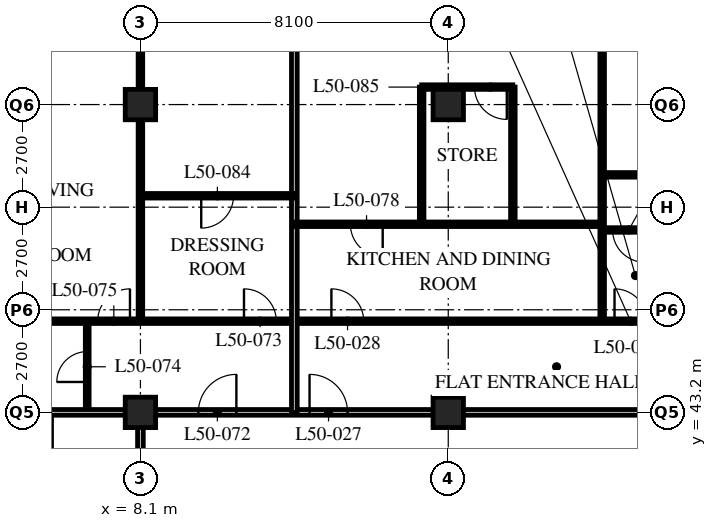
"""IFC4 building model, lengths in metres.
Left out: names, types, materials, properties, quantities, classifications, styles, units other than length and angle.
Written with IfcOpenShell. Run it as: python <this file> out.ifc"""

import sys

from ifc_helpers import new_model, si_unit, direction, frame, frame_2d, origin, origin_2d, place, context, subcontext, project, spatial, rectangle, hollow_rectangle, extrude, element, fill, save


model = new_model("IFC4")
c1 = context("Model", 3, precision=1e-05, world=origin(), true_north=direction((0.0, 1.0)))
c2 = subcontext(c1, "Body", "Model", "MODEL_VIEW")
j1 = project(units=[si_unit("LENGTHUNIT", "METRE"), si_unit("PLANEANGLEUNIT", "RADIAN")], contexts=[c1])
p1 = place(None, origin())
s1 = spatial("IfcSite", under=j1, at=p1, CompositionType="ELEMENT")
p2 = place(p1, origin())
s2 = spatial("IfcBuilding", under=s1, at=p2, CompositionType="ELEMENT")
p3 = place(p2, frame((0.0, 0.0, 195.6)))
s3 = spatial("IfcBuildingStorey", under=s2, at=p3, CompositionType="ELEMENT", Elevation=195.6)
for number, where, z_axis, x_axis in (
    (1, (8.1, 43.2, 0.0), (0.0, 0.0, 1.0), (1.0, 0.0, 0.0)),
    (2, (8.1, 51.3, 0.0), (0.0, 0.0, 1.0), (1.0, 0.0, 0.0)),
    (3, (16.2, 43.2, 0.0), (0.0, 0.0, 1.0), (1.0, 0.0, 0.0)),
    (4, (16.2, 51.3, 0.0), (0.0, 0.0, 1.0), (1.0, 0.0, 0.0)),
):
    element("IfcColumn", number, at=place(p3, frame(where, z_axis=z_axis, x_axis=x_axis)), inside=s3, PredefinedType="COLUMN", context=c2, shape_type="SweptSolid", body=[
        extrude(hollow_rectangle(XDim=0.8, YDim=0.8, WallThickness=0.08, at=origin_2d()), origin(), (0.0, 0.0, 1.0), 3.6),
    ])
p4 = place(p3, frame((8.1, 43.2, 0.0), z_axis=(0.0, 0.0, 1.0), x_axis=(1.0, 0.0, 0.0)))
e5 = element("IfcWall", 5, at=p4, inside=s3, PredefinedType="PARTITIONING", context=c2, shape_type="SweptSolid", body=[
    extrude(rectangle(XDim=40.5, YDim=0.15, at=frame_2d((20.25, 0.0))), origin(), (0.0, 0.0, 1.0), 2.778),
])
p5 = place(p4, frame((4.45, 0.0, 0.0)))
e6 = element("IfcOpeningElement", 6, at=p5, cuts=e5, PredefinedType="OPENING", context=c2, shape_type="SweptSolid", body=[
    extrude(rectangle(XDim=1.0, YDim=2.1, at=frame_2d((0.5, 1.05))), frame((0.0, 0.085, 0.0), z_axis=(0.0, -1.0, 0.0), x_axis=(1.0, 0.0, 0.0)), (0.0, 0.0, 1.0), 0.17),
])
p6 = place(p4, frame((20.65, 0.0, 0.0)))
e7 = element("IfcOpeningElement", 7, at=p6, cuts=e5, PredefinedType="OPENING", context=c2, shape_type="SweptSolid", body=[
    extrude(rectangle(XDim=1.0, YDim=2.1, at=frame_2d((0.5, 1.05))), frame((0.0, 0.085, 0.0), z_axis=(0.0, -1.0, 0.0), x_axis=(1.0, 0.0, 0.0)), (0.0, 0.0, 1.0), 0.17),
])
p7 = place(p4, frame((28.75, 0.0, 0.0)))
e8 = element("IfcOpeningElement", 8, at=p7, cuts=e5, PredefinedType="OPENING", context=c2, shape_type="SweptSolid", body=[
    extrude(rectangle(XDim=1.0, YDim=2.1, at=frame_2d((0.5, 1.05))), frame((0.0, 0.085, 0.0), z_axis=(0.0, -1.0, 0.0), x_axis=(1.0, 0.0, 0.0)), (0.0, 0.0, 1.0), 0.17),
])
p8 = place(p4, frame((37.975, 0.0, 0.0)))
e9 = element("IfcOpeningElement", 9, at=p8, cuts=e5, PredefinedType="OPENING", context=c2, shape_type="SweptSolid", body=[
    extrude(rectangle(XDim=1.0, YDim=2.1, at=frame_2d((0.5, 1.05))), frame((0.0, 0.085, 0.0), z_axis=(0.0, -1.0, 0.0), x_axis=(1.0, 0.0, 0.0)), (0.0, 0.0, 1.0), 0.17),
])
p9 = place(p4, frame((1.525, 0.0, 0.0)))
e10 = element("IfcOpeningElement", 10, at=p9, cuts=e5, PredefinedType="OPENING", context=c2, shape_type="SweptSolid", body=[
    extrude(rectangle(XDim=1.0, YDim=2.1, at=frame_2d((0.5, 1.05))), frame((0.0, 0.085, 0.0), z_axis=(0.0, -1.0, 0.0), x_axis=(1.0, 0.0, 0.0)), (0.0, 0.0, 1.0), 0.17),
])
p10 = place(p3, frame((8.1, 18.9, 0.0), z_axis=(0.0, 0.0, 1.0), x_axis=(0.0, 1.0, 0.0)))
e11 = element("IfcWall", 11, at=p10, inside=s3, PredefinedType="PARTITIONING", context=c2, shape_type="SweptSolid", body=[
    extrude(rectangle(XDim=24.3, YDim=0.15, at=frame_2d((12.15, 0.0))), origin(), (0.0, 0.0, 1.0), 2.778),
])
p11 = place(p10, frame((0.9, 0.0, 0.0)))
e12 = element("IfcOpeningElement", 12, at=p11, cuts=e11, PredefinedType="OPENING", context=c2, shape_type="SweptSolid", body=[
    extrude(rectangle(XDim=1.0, YDim=2.1, at=frame_2d((0.5, 1.05))), frame((0.0, 0.085, 0.0), z_axis=(0.0, -1.0, 0.0), x_axis=(1.0, 0.0, 0.0)), (0.0, 0.0, 1.0), 0.17),
])
p12 = place(p10, frame((9.0, 0.0, 0.0)))
e13 = element("IfcOpeningElement", 13, at=p12, cuts=e11, PredefinedType="OPENING", context=c2, shape_type="SweptSolid", body=[
    extrude(rectangle(XDim=1.0, YDim=2.1, at=frame_2d((0.5, 1.05))), frame((0.0, 0.085, 0.0), z_axis=(0.0, -1.0, 0.0), x_axis=(1.0, 0.0, 0.0)), (0.0, 0.0, 1.0), 0.17),
])
p13 = place(p10, frame((17.1, 0.0, 0.0)))
e14 = element("IfcOpeningElement", 14, at=p13, cuts=e11, PredefinedType="OPENING", context=c2, shape_type="SweptSolid", body=[
    extrude(rectangle(XDim=1.0, YDim=2.1, at=frame_2d((0.5, 1.05))), frame((0.0, 0.085, 0.0), z_axis=(0.0, -1.0, 0.0), x_axis=(1.0, 0.0, 0.0)), (0.0, 0.0, 1.0), 0.17),
])
p14 = place(p3, frame((20.25, 45.6, 0.0), z_axis=(0.0, 0.0, 1.0), x_axis=(0.0, 1.0, 0.0)))
e15 = element("IfcWall", 15, at=p14, inside=s3, PredefinedType="PARTITIONING", context=c2, shape_type="SweptSolid", body=[
    extrude(rectangle(XDim=13.5, YDim=0.12, at=frame_2d((6.75, 0.0))), origin(), (0.0, 0.0, 1.0), 3.39),
])
p15 = place(p3, frame((6.7, 43.2, 0.0), z_axis=(0.0, 0.0, 1.0), x_axis=(0.0, 1.0, 0.0)))
e16 = element("IfcWall", 16, at=p15, inside=s3, PredefinedType="PARTITIONING", context=c2, shape_type="SweptSolid", body=[
    extrude(rectangle(XDim=2.4, YDim=0.1, at=frame_2d((1.2, 0.0))), origin(), (0.0, 0.0, 1.0), 3.39),
])
p16 = place(p15, frame((0.8, 0.0, 0.0)))
e17 = element("IfcOpeningElement", 17, at=p16, cuts=e16, PredefinedType="OPENING", context=c2, shape_type="SweptSolid", body=[
    extrude(rectangle(XDim=0.8, YDim=2.1, at=frame_2d((0.4, 1.05))), frame((0.0, 0.06, 0.0), z_axis=(0.0, -1.0, 0.0), x_axis=(1.0, 0.0, 0.0)), (0.0, 0.0, 1.0), 0.12),
])
p17 = place(p3, frame((4.1, 45.6, 0.0), z_axis=(0.0, 0.0, 1.0), x_axis=(1.0, 0.0, 0.0)))
e18 = element("IfcWall", 18, at=p17, inside=s3, PredefinedType="PARTITIONING", context=c2, shape_type="SweptSolid", body=[
    extrude(rectangle(XDim=48.5, YDim=0.12, at=frame_2d((24.25, 0.0))), origin(), (0.0, 0.0, 1.0), 3.39),
])
p18 = place(p17, frame((9.025, 0.0, 0.0)))
e19 = element("IfcOpeningElement", 19, at=p18, cuts=e18, PredefinedType="OPENING", context=c2, shape_type="SweptSolid", body=[
    extrude(rectangle(XDim=0.85, YDim=2.1, at=frame_2d((0.425, 1.05))), frame((0.0, 0.07, 0.0), z_axis=(0.0, -1.0, 0.0), x_axis=(1.0, 0.0, 0.0)), (0.0, 0.0, 1.0), 0.14),
])
p19 = place(p17, frame((16.475, 0.0, 0.0)))
e20 = element("IfcOpeningElement", 20, at=p19, cuts=e18, PredefinedType="OPENING", context=c2, shape_type="SweptSolid", body=[
    extrude(rectangle(XDim=0.85, YDim=2.1, at=frame_2d((0.425, 1.05))), frame((0.0, 0.07, 0.0), z_axis=(0.0, -1.0, 0.0), x_axis=(1.0, 0.0, 0.0)), (0.0, 0.0, 1.0), 0.14),
])
p20 = place(p17, frame((20.525, 0.0, 0.0)))
e21 = element("IfcOpeningElement", 21, at=p20, cuts=e18, PredefinedType="OPENING", context=c2, shape_type="SweptSolid", body=[
    extrude(rectangle(XDim=0.85, YDim=2.1, at=frame_2d((0.425, 1.05))), frame((0.0, 0.07, 0.0), z_axis=(0.0, -1.0, 0.0), x_axis=(1.0, 0.0, 0.0)), (0.0, 0.0, 1.0), 0.14),
])
p21 = place(p17, frame((25.225, 0.0, 0.0)))
e22 = element("IfcOpeningElement", 22, at=p21, cuts=e18, PredefinedType="OPENING", context=c2, shape_type="SweptSolid", body=[
    extrude(rectangle(XDim=0.85, YDim=2.1, at=frame_2d((0.425, 1.05))), frame((0.0, 0.07, 0.0), z_axis=(0.0, -1.0, 0.0), x_axis=(1.0, 0.0, 0.0)), (0.0, 0.0, 1.0), 0.14),
])
p22 = place(p17, frame((28.625, 0.0, 0.0)))
e23 = element("IfcOpeningElement", 23, at=p22, cuts=e18, PredefinedType="OPENING", context=c2, shape_type="SweptSolid", body=[
    extrude(rectangle(XDim=0.85, YDim=2.1, at=frame_2d((0.425, 1.05))), frame((0.0, 0.07, 0.0), z_axis=(0.0, -1.0, 0.0), x_axis=(1.0, 0.0, 0.0)), (0.0, 0.0, 1.0), 0.14),
])
p23 = place(p17, frame((33.325, 0.0, 0.0)))
e24 = element("IfcOpeningElement", 24, at=p23, cuts=e18, PredefinedType="OPENING", context=c2, shape_type="SweptSolid", body=[
    extrude(rectangle(XDim=0.85, YDim=2.1, at=frame_2d((0.425, 1.05))), frame((0.0, 0.07, 0.0), z_axis=(0.0, -1.0, 0.0), x_axis=(1.0, 0.0, 0.0)), (0.0, 0.0, 1.0), 0.14),
])
p24 = place(p17, frame((36.725, 0.0, 0.0)))
e25 = element("IfcOpeningElement", 25, at=p24, cuts=e18, PredefinedType="OPENING", context=c2, shape_type="SweptSolid", body=[
    extrude(rectangle(XDim=0.85, YDim=2.1, at=frame_2d((0.425, 1.05))), frame((0.0, 0.07, 0.0), z_axis=(0.0, -1.0, 0.0), x_axis=(1.0, 0.0, 0.0)), (0.0, 0.0, 1.0), 0.14),
])
p25 = place(p17, frame((40.925, 0.0, 0.0)))
e26 = element("IfcOpeningElement", 26, at=p25, cuts=e18, PredefinedType="OPENING", context=c2, shape_type="SweptSolid", body=[
    extrude(rectangle(XDim=0.85, YDim=2.1, at=frame_2d((0.425, 1.05))), frame((0.0, 0.07, 0.0), z_axis=(0.0, -1.0, 0.0), x_axis=(1.0, 0.0, 0.0)), (0.0, 0.0, 1.0), 0.14),
])
p26 = place(p17, frame((44.775, 0.0, 0.0)))
e27 = element("IfcOpeningElement", 27, at=p26, cuts=e18, PredefinedType="OPENING", context=c2, shape_type="SweptSolid", body=[
    extrude(rectangle(XDim=0.85, YDim=2.1, at=frame_2d((0.425, 1.05))), frame((0.0, 0.07, 0.0), z_axis=(0.0, -1.0, 0.0), x_axis=(1.0, 0.0, 0.0)), (0.0, 0.0, 1.0), 0.14),
])
p27 = place(p17, frame((6.725, 0.0, 0.0)))
e28 = element("IfcOpeningElement", 28, at=p27, cuts=e18, PredefinedType="OPENING", context=c2, shape_type="SweptSolid", body=[
    extrude(rectangle(XDim=0.85, YDim=2.1, at=frame_2d((0.425, 1.05))), frame((0.0, 0.07, 0.0), z_axis=(0.0, -1.0, 0.0), x_axis=(1.0, 0.0, 0.0)), (0.0, 0.0, 1.0), 0.14),
])
p28 = place(p17, frame((2.875, 0.0, 0.0)))
e29 = element("IfcOpeningElement", 29, at=p28, cuts=e18, PredefinedType="OPENING", context=c2, shape_type="SweptSolid", body=[
    extrude(rectangle(XDim=0.85, YDim=2.1, at=frame_2d((0.425, 1.05))), frame((0.0, 0.07, 0.0), z_axis=(0.0, -1.0, 0.0), x_axis=(1.0, 0.0, 0.0)), (0.0, 0.0, 1.0), 0.14),
])
p29 = place(p3, frame((8.1, 45.6, 0.0), z_axis=(0.0, 0.0, 1.0), x_axis=(0.0, 1.0, 0.0)))
e30 = element("IfcWall", 30, at=p29, inside=s3, PredefinedType="PARTITIONING", context=c2, shape_type="SweptSolid", body=[
    extrude(rectangle(XDim=9.45, YDim=0.12, at=frame_2d((4.725, 0.0))), origin(), (0.0, 0.0, 1.0), 2.778),
])
p30 = place(p3, frame((0.3, 43.2, 0.0), z_axis=(0.0, 0.0, 1.0), x_axis=(1.0, 0.0, 0.0)))
e31 = element("IfcWall", 31, at=p30, inside=s3, PredefinedType="PARTITIONING", context=c2, shape_type="SweptSolid", body=[
    extrude(rectangle(XDim=7.8, YDim=0.15, at=frame_2d((3.9, 0.0))), origin(), (0.0, 0.0, 1.0), 2.778),
])
p31 = place(p3, frame((12.15, 43.2, 0.0), z_axis=(0.0, 0.0, 1.0), x_axis=(0.0, 1.0, 0.0)))
e32 = element("IfcWall", 32, at=p31, inside=s3, PredefinedType="PARTITIONING", context=c2, shape_type="SweptSolid", body=[
    extrude(rectangle(XDim=15.9, YDim=0.15, at=frame_2d((7.95, 0.0))), origin(), (0.0, 0.0, 1.0), 3.39),
])
p32 = place(p3, frame((20.25, 48.0, 0.0), z_axis=(0.0, 0.0, 1.0), x_axis=(1.0, 0.0, 0.0)))
e33 = element("IfcWall", 33, at=p32, inside=s3, PredefinedType="PARTITIONING", context=c2, shape_type="SweptSolid", body=[
    extrude(rectangle(XDim=1.76, YDim=0.12, at=frame_2d((0.88, 0.0))), origin(), (0.0, 0.0, 1.0), 3.39),
])
p33 = place(p32, frame((0.275, 0.0, 0.0)))
e34 = element("IfcOpeningElement", 34, at=p33, cuts=e33, PredefinedType="OPENING", context=c2, shape_type="SweptSolid", body=[
    extrude(rectangle(XDim=0.85, YDim=2.1, at=frame_2d((0.425, 1.05))), frame((0.0, 0.07, 0.0), z_axis=(0.0, -1.0, 0.0), x_axis=(1.0, 0.0, 0.0)), (0.0, 0.0, 1.0), 0.14),
])
p34 = place(p3, frame((12.15, 48.15, 0.0), z_axis=(0.0, 0.0, 1.0), x_axis=(1.0, 0.0, 0.0)))
e35 = element("IfcWall", 35, at=p34, inside=s3, PredefinedType="PARTITIONING", context=c2, shape_type="SweptSolid", body=[
    extrude(rectangle(XDim=8.1, YDim=0.12, at=frame_2d((4.05, 0.0))), origin(), (0.0, 0.0, 1.0), 3.39),
])
p35 = place(p34, frame((1.475, 0.0, 0.0)))
e36 = element("IfcOpeningElement", 36, at=p35, cuts=e35, PredefinedType="OPENING", context=c2, shape_type="SweptSolid", body=[
    extrude(rectangle(XDim=0.85, YDim=2.1, at=frame_2d((0.425, 1.05))), frame((0.0, 0.07, 0.0), z_axis=(0.0, -1.0, 0.0), x_axis=(1.0, 0.0, 0.0)), (0.0, 0.0, 1.0), 0.14),
])
p36 = place(p3, frame((20.25, 49.45, 0.0), z_axis=(0.0, 0.0, 1.0), x_axis=(1.0, 0.0, 0.0)))
e37 = element("IfcWall", 37, at=p36, inside=s3, PredefinedType="PARTITIONING", context=c2, shape_type="SweptSolid", body=[
    extrude(rectangle(XDim=4.05, YDim=0.12, at=frame_2d((2.025, 0.0))), origin(), (0.0, 0.0, 1.0), 3.39),
])
p37 = place(p36, frame((1.6, 0.0, 0.0)))
e38 = element("IfcOpeningElement", 38, at=p37, cuts=e37, PredefinedType="OPENING", context=c2, shape_type="SweptSolid", body=[
    extrude(rectangle(XDim=0.85, YDim=2.1, at=frame_2d((0.425, 1.05))), frame((0.0, 0.07, 0.0), z_axis=(0.0, -1.0, 0.0), x_axis=(1.0, 0.0, 0.0)), (0.0, 0.0, 1.0), 0.14),
])
p38 = place(p3, frame((8.1, 48.9, 0.0), z_axis=(0.0, 0.0, 1.0), x_axis=(1.0, 0.0, 0.0)))
e39 = element("IfcWall", 39, at=p38, inside=s3, PredefinedType="PARTITIONING", context=c2, shape_type="SweptSolid", body=[
    extrude(rectangle(XDim=4.05, YDim=0.12, at=frame_2d((2.025, 0.0))), origin(), (0.0, 0.0, 1.0), 3.39),
])
p39 = place(p38, frame((1.6, 0.0, 0.0)))
e40 = element("IfcOpeningElement", 40, at=p39, cuts=e39, PredefinedType="OPENING", context=c2, shape_type="SweptSolid", body=[
    extrude(rectangle(XDim=0.85, YDim=2.1, at=frame_2d((0.425, 1.05))), frame((0.0, 0.07, 0.0), z_axis=(0.0, -1.0, 0.0), x_axis=(1.0, 0.0, 0.0)), (0.0, 0.0, 1.0), 0.14),
])
for number, where, z_axis, x_axis in (
    (41, (15.5, 48.15, 0.0), (0.0, 0.0, 1.0), (0.0, 1.0, 0.0)),
    (42, (17.9, 48.15, 0.0), (0.0, 0.0, 1.0), (0.0, 1.0, 0.0)),
):
    element("IfcWall", number, at=place(p3, frame(where, z_axis=z_axis, x_axis=x_axis)), inside=s3, PredefinedType="PARTITIONING", context=c2, shape_type="SweptSolid", body=[
        extrude(rectangle(XDim=3.61, YDim=0.12, at=frame_2d((1.805, 0.0))), origin(), (0.0, 0.0, 1.0), 3.39),
    ])
p40 = place(p3, frame((15.5, 51.76, 0.0), z_axis=(0.0, 0.0, 1.0), x_axis=(1.0, 0.0, 0.0)))
e43 = element("IfcWall", 43, at=p40, inside=s3, PredefinedType="PARTITIONING", context=c2, shape_type="SweptSolid", body=[
    extrude(rectangle(XDim=2.4, YDim=0.12, at=frame_2d((1.2, 0.0))), origin(), (0.0, 0.0, 1.0), 3.39),
])
p41 = place(p40, frame((1.39, 0.0, 0.0)))
e44 = element("IfcOpeningElement", 44, at=p41, cuts=e43, PredefinedType="OPENING", context=c2, shape_type="SweptSolid", body=[
    extrude(rectangle(XDim=0.85, YDim=2.1, at=frame_2d((0.425, 1.05))), frame((0.0, 0.07, 0.0), z_axis=(0.0, -1.0, 0.0), x_axis=(1.0, 0.0, 0.0)), (0.0, 0.0, 1.0), 0.14),
])
p42 = place(p5, origin())
e45 = element("IfcDoor", 45, at=p42, inside=s3, OperationType="SINGLE_SWING_LEFT", PredefinedType="DOOR", context=c2, shape_type="SweptSolid", body=[
    extrude(rectangle(XDim=1.0, YDim=2.1, at=frame_2d((0.5, 1.05))), frame((0.0, 0.025, 0.0), z_axis=(0.0, -1.0, 0.0), x_axis=(1.0, 0.0, 0.0)), (0.0, 0.0, 1.0), 0.05),
])
fill(e6, e45)
p43 = place(p18, origin())
e46 = element("IfcDoor", 46, at=p43, inside=s3, OperationType="SINGLE_SWING_LEFT", PredefinedType="DOOR", context=c2, shape_type="SweptSolid", body=[
    extrude(rectangle(XDim=0.85, YDim=2.1, at=frame_2d((0.425, 1.05))), frame((0.0, 0.025, 0.0), z_axis=(0.0, -1.0, 0.0), x_axis=(1.0, 0.0, 0.0)), (0.0, 0.0, 1.0), 0.05),
])
fill(e19, e46)
p44 = place(p19, origin())
e47 = element("IfcDoor", 47, at=p44, inside=s3, OperationType="SINGLE_SWING_LEFT", PredefinedType="DOOR", context=c2, shape_type="SweptSolid", body=[
    extrude(rectangle(XDim=0.85, YDim=2.1, at=frame_2d((0.425, 1.05))), frame((0.0, 0.025, 0.0), z_axis=(0.0, -1.0, 0.0), x_axis=(1.0, 0.0, 0.0)), (0.0, 0.0, 1.0), 0.05),
])
fill(e20, e47)
p45 = place(p9, origin())
e48 = element("IfcDoor", 48, at=p45, inside=s3, OperationType="SINGLE_SWING_RIGHT", PredefinedType="DOOR", context=c2, shape_type="SweptSolid", body=[
    extrude(rectangle(XDim=1.0, YDim=2.1, at=frame_2d((0.5, 1.05))), frame((0.0, 0.025, 0.0), z_axis=(0.0, -1.0, 0.0), x_axis=(1.0, 0.0, 0.0)), (0.0, 0.0, 1.0), 0.05),
])
fill(e10, e48)
p46 = place(p27, origin())
e49 = element("IfcDoor", 49, at=p46, inside=s3, OperationType="SINGLE_SWING_LEFT", PredefinedType="DOOR", context=c2, shape_type="SweptSolid", body=[
    extrude(rectangle(XDim=0.85, YDim=2.1, at=frame_2d((0.425, 1.05))), frame((0.0, 0.025, 0.0), z_axis=(0.0, -1.0, 0.0), x_axis=(1.0, 0.0, 0.0)), (0.0, 0.0, 1.0), 0.05),
])
fill(e28, e49)
p47 = place(p16, origin())
e50 = element("IfcDoor", 50, at=p47, inside=s3, OperationType="SINGLE_SWING_LEFT", PredefinedType="DOOR", context=c2, shape_type="SweptSolid", body=[
    extrude(rectangle(XDim=0.8, YDim=2.1, at=frame_2d((0.4, 1.05))), frame((0.0, 0.025, 0.0), z_axis=(0.0, -1.0, 0.0), x_axis=(1.0, 0.0, 0.0)), (0.0, 0.0, 1.0), 0.05),
])
fill(e17, e50)
p48 = place(p28, origin())
e51 = element("IfcDoor", 51, at=p48, inside=s3, OperationType="SINGLE_SWING_RIGHT", PredefinedType="DOOR", context=c2, shape_type="SweptSolid", body=[
    extrude(rectangle(XDim=0.85, YDim=2.1, at=frame_2d((0.425, 1.05))), frame((0.0, 0.025, 0.0), z_axis=(0.0, -1.0, 0.0), x_axis=(1.0, 0.0, 0.0)), (0.0, 0.0, 1.0), 0.05),
])
fill(e29, e51)
p49 = place(p33, origin())
e52 = element("IfcDoor", 52, at=p49, inside=s3, OperationType="SINGLE_SWING_LEFT", PredefinedType="DOOR", context=c2, shape_type="SweptSolid", body=[
    extrude(rectangle(XDim=0.85, YDim=2.1, at=frame_2d((0.425, 1.05))), frame((0.0, 0.025, 0.0), z_axis=(0.0, -1.0, 0.0), x_axis=(1.0, 0.0, 0.0)), (0.0, 0.0, 1.0), 0.05),
])
fill(e34, e52)
p50 = place(p35, origin())
e53 = element("IfcDoor", 53, at=p50, inside=s3, OperationType="SINGLE_SWING_LEFT", PredefinedType="DOOR", context=c2, shape_type="SweptSolid", body=[
    extrude(rectangle(XDim=0.85, YDim=2.1, at=frame_2d((0.425, 1.05))), frame((0.0, 0.025, 0.0), z_axis=(0.0, -1.0, 0.0), x_axis=(1.0, 0.0, 0.0)), (0.0, 0.0, 1.0), 0.05),
])
fill(e36, e53)
p51 = place(p39, origin())
e54 = element("IfcDoor", 54, at=p51, inside=s3, OperationType="SINGLE_SWING_RIGHT", PredefinedType="DOOR", context=c2, shape_type="SweptSolid", body=[
    extrude(rectangle(XDim=0.85, YDim=2.1, at=frame_2d((0.425, 1.05))), frame((0.0, 0.025, 0.0), z_axis=(0.0, -1.0, 0.0), x_axis=(1.0, 0.0, 0.0)), (0.0, 0.0, 1.0), 0.05),
])
fill(e40, e54)
p52 = place(p41, origin())
e55 = element("IfcDoor", 55, at=p52, inside=s3, OperationType="SINGLE_SWING_LEFT", PredefinedType="DOOR", context=c2, shape_type="SweptSolid", body=[
    extrude(rectangle(XDim=0.85, YDim=2.1, at=frame_2d((0.425, 1.05))), frame((0.0, 0.025, 0.0), z_axis=(0.0, -1.0, 0.0), x_axis=(1.0, 0.0, 0.0)), (0.0, 0.0, 1.0), 0.05),
])
fill(e44, e55)
save(model, sys.argv[1])
